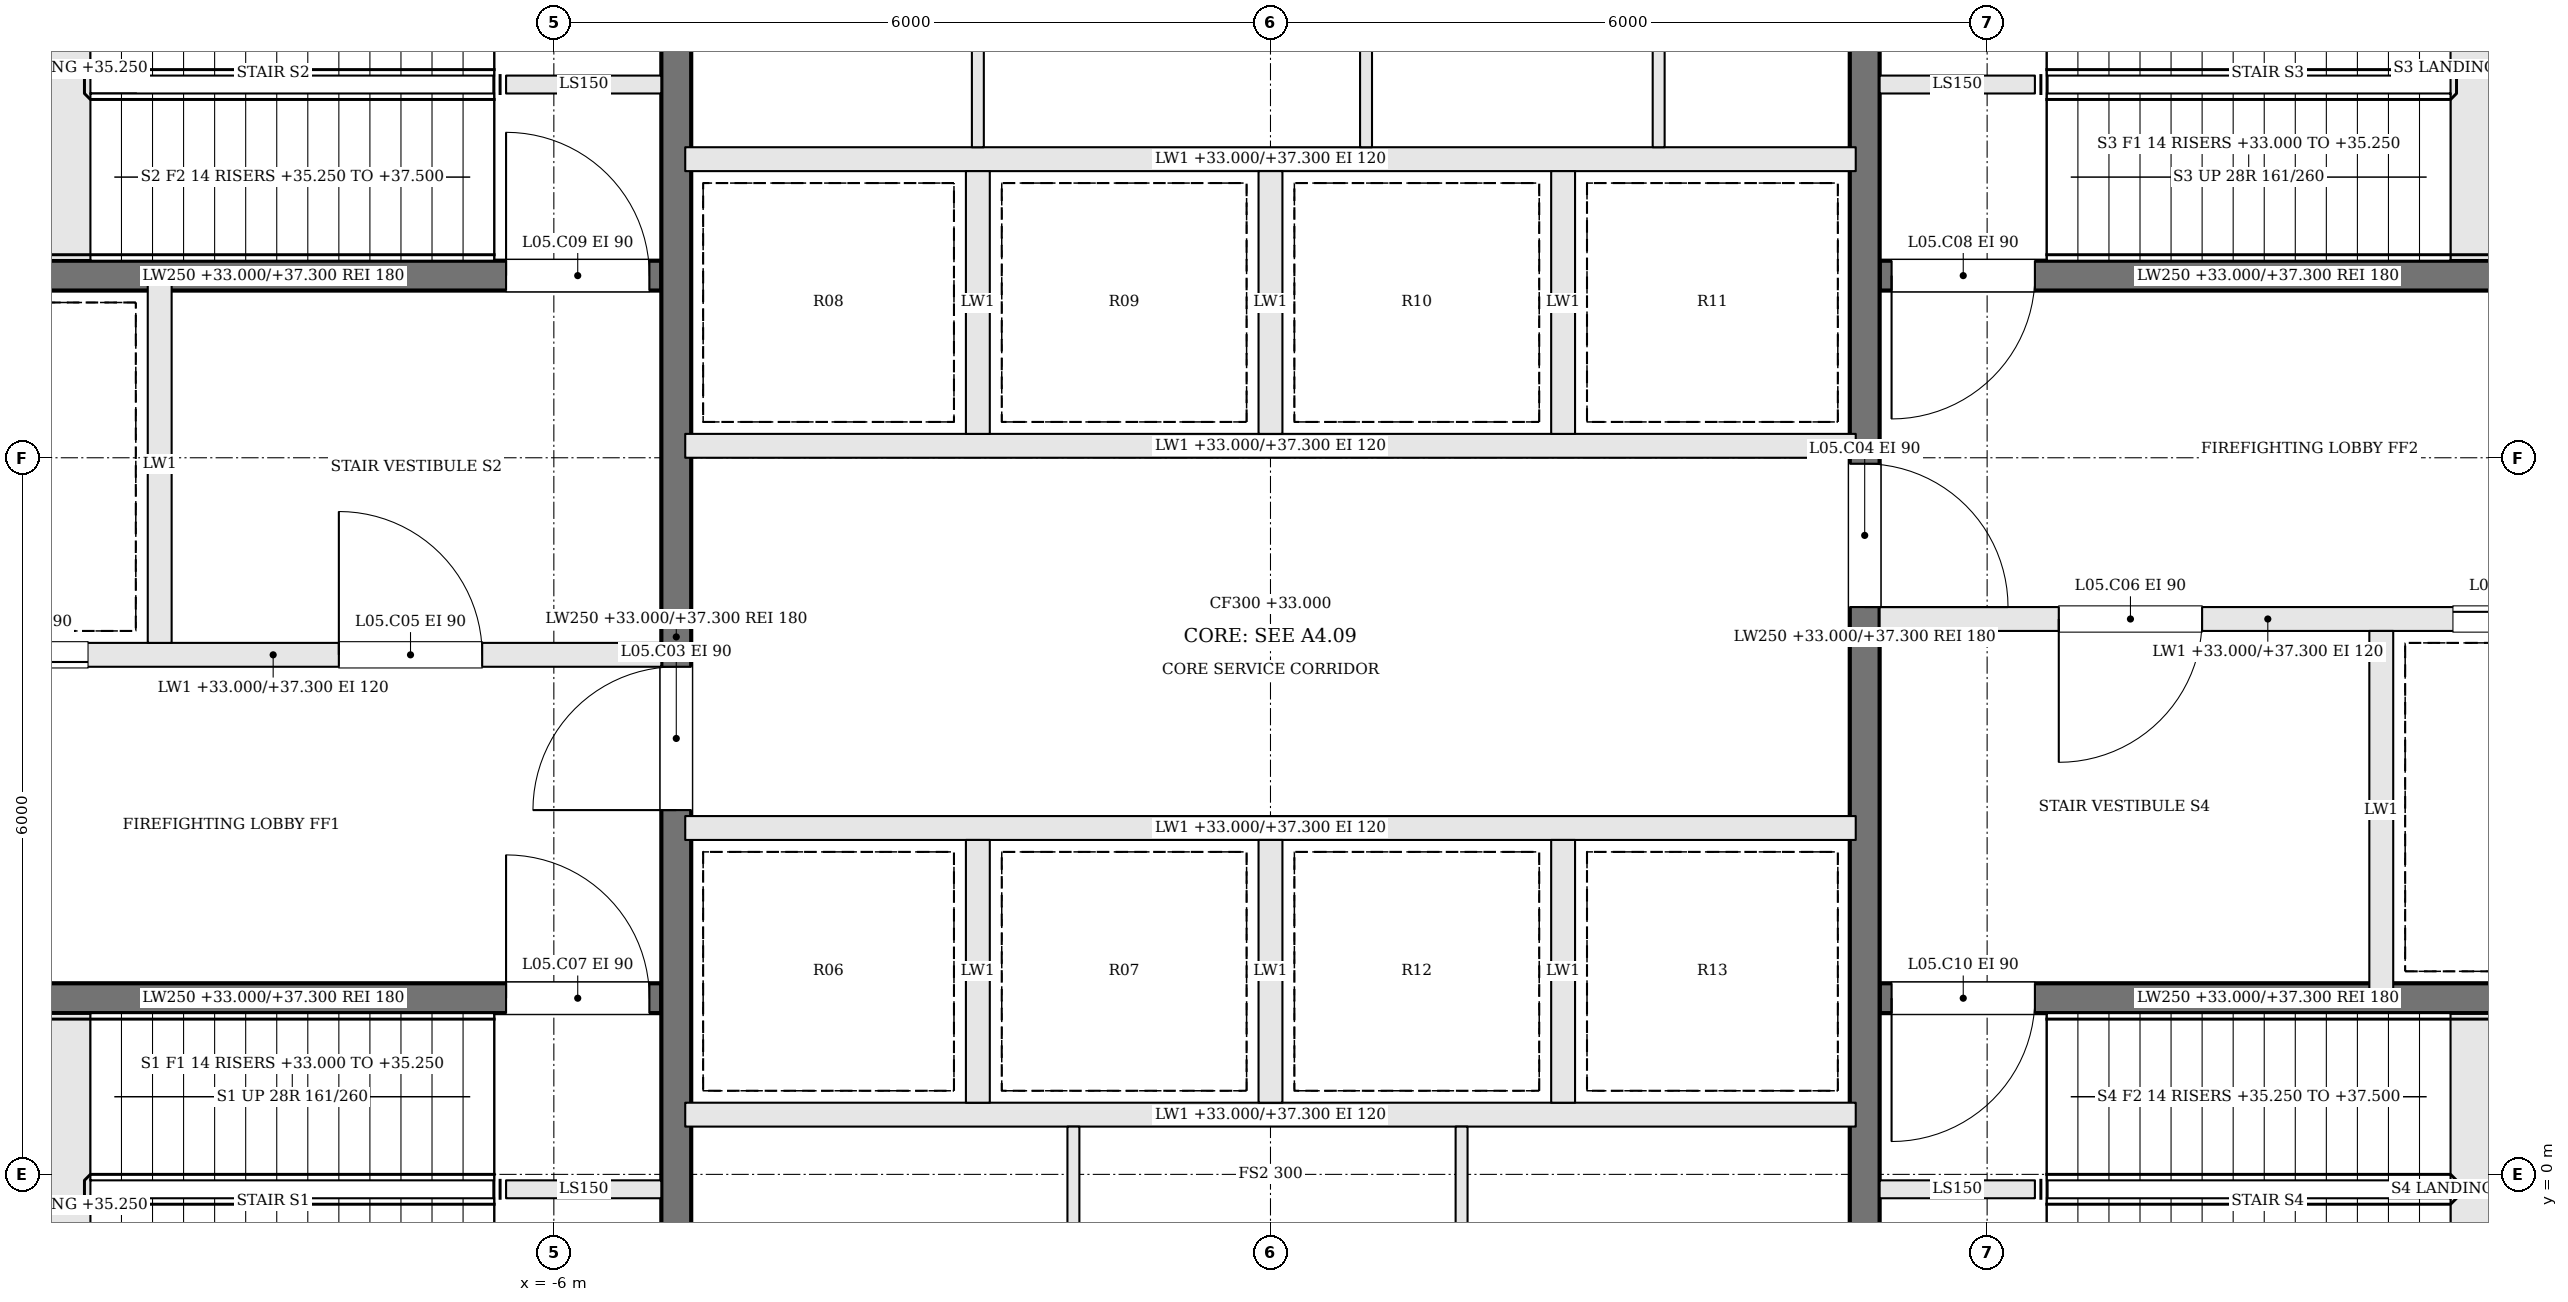
"""IFC4 building model, lengths in metres.
Left out: names, types, materials, properties, quantities, classifications, styles, units other than length and angle.
Written with IfcOpenShell. Run it as: python <this file> out.ifc"""

import sys

from ifc_helpers import new_model, si_unit, direction, frame, frame_2d, origin, place, context, subcontext, project, spatial, rectangle, extrude, element, fill, save


model = new_model("IFC4")
c1 = context("Model", 3, precision=1e-05, world=origin(), true_north=direction((0.0, 1.0)))
c2 = subcontext(c1, "Body", "Model", "MODEL_VIEW")
j1 = project(units=[si_unit("LENGTHUNIT", "METRE"), si_unit("PLANEANGLEUNIT", "RADIAN")], contexts=[c1])
p1 = place(None, origin())
s1 = spatial("IfcSite", under=j1, at=p1, CompositionType="ELEMENT")
p2 = place(p1, origin())
s2 = spatial("IfcBuilding", under=s1, at=p2, CompositionType="ELEMENT")
p3 = place(p2, frame((0.0, 0.0, 33.0)))
s3 = spatial("IfcBuildingStorey", under=s2, at=p3, CompositionType="ELEMENT", Elevation=33.0)
for number, where, z_axis, x_axis in (
    (1, (-6.4, -0.125, 0.0), (0.0, 0.0, 1.0), (1.0, 0.0, 0.0)),
    (2, (6.4, 9.125, 0.0), (0.0, 0.0, 1.0), (-1.0, 0.0, 0.0)),
    (3, (-6.4, 9.125, 0.0), (0.0, 0.0, 1.0), (1.0, 0.0, 0.0)),
    (4, (6.4, -0.125, 0.0), (0.0, 0.0, 1.0), (-1.0, 0.0, 0.0)),
):
    element("IfcWall", number, at=place(p3, frame(where, z_axis=z_axis, x_axis=x_axis)), inside=s3, PredefinedType="SOLIDWALL", context=c2, shape_type="SweptSolid", body=[
        extrude(rectangle(XDim=1.3, YDim=0.15, at=frame_2d((0.65, 0.0))), origin(), (0.0, 0.0, 1.0), 4.3),
    ])
p4 = place(p3, frame((-11.6, 1.475, 0.0), z_axis=(0.0, 0.0, 1.0), x_axis=(1.0, 0.0, 0.0)))
e5 = element("IfcWall", 5, at=p4, inside=s3, PredefinedType="SOLIDWALL", context=c2, shape_type="SweptSolid", body=[
    extrude(rectangle(XDim=6.5, YDim=0.25, at=frame_2d((3.25, 0.0))), origin(), (0.0, 0.0, 1.0), 4.3),
])
p5 = place(p4, frame((5.2, 0.0, 0.0)))
e6 = element("IfcOpeningElement", 6, at=p5, cuts=e5, PredefinedType="OPENING", context=c2, shape_type="SweptSolid", body=[
    extrude(rectangle(XDim=1.2, YDim=2.1, at=frame_2d((0.6, 1.05))), frame((0.0, 0.135, 0.0), z_axis=(0.0, -1.0, 0.0), x_axis=(1.0, 0.0, 0.0)), (0.0, 0.0, 1.0), 0.27),
])
p6 = place(p3, frame((11.6, 7.525, 0.0), z_axis=(0.0, 0.0, 1.0), x_axis=(-1.0, 0.0, 0.0)))
e7 = element("IfcWall", 7, at=p6, inside=s3, PredefinedType="SOLIDWALL", context=c2, shape_type="SweptSolid", body=[
    extrude(rectangle(XDim=6.5, YDim=0.25, at=frame_2d((3.25, 0.0))), origin(), (0.0, 0.0, 1.0), 4.3),
])
p7 = place(p6, frame((5.2, 0.0, 0.0)))
e8 = element("IfcOpeningElement", 8, at=p7, cuts=e7, PredefinedType="OPENING", context=c2, shape_type="SweptSolid", body=[
    extrude(rectangle(XDim=1.2, YDim=2.1, at=frame_2d((0.6, 1.05))), frame((0.0, 0.135, 0.0), z_axis=(0.0, -1.0, 0.0), x_axis=(1.0, 0.0, 0.0)), (0.0, 0.0, 1.0), 0.27),
])
p8 = place(p3, frame((-11.6, 4.35, 0.0), z_axis=(0.0, 0.0, 1.0), x_axis=(1.0, 0.0, 0.0)))
e9 = element("IfcWall", 9, at=p8, inside=s3, PredefinedType="SOLIDWALL", context=c2, shape_type="SweptSolid", body=[
    extrude(rectangle(XDim=6.5, YDim=0.2, at=frame_2d((3.25, 0.0))), origin(), (0.0, 0.0, 1.0), 4.3),
])
p9 = place(p8, frame((3.8, 0.0, 0.0)))
e10 = element("IfcOpeningElement", 10, at=p9, cuts=e9, PredefinedType="OPENING", context=c2, shape_type="SweptSolid", body=[
    extrude(rectangle(XDim=1.2, YDim=2.1, at=frame_2d((0.6, 1.05))), frame((0.0, 0.11, 0.0), z_axis=(0.0, -1.0, 0.0), x_axis=(1.0, 0.0, 0.0)), (0.0, 0.0, 1.0), 0.22),
])
p10 = place(p8, frame((0.5, 0.0, 0.0)))
e11 = element("IfcOpeningElement", 11, at=p10, cuts=e9, PredefinedType="OPENING", context=c2, shape_type="SweptSolid", body=[
    extrude(rectangle(XDim=1.2, YDim=2.1, at=frame_2d((0.6, 1.05))), frame((0.0, 0.11, 0.0), z_axis=(0.0, -1.0, 0.0), x_axis=(1.0, 0.0, 0.0)), (0.0, 0.0, 1.0), 0.22),
])
p11 = place(p3, frame((11.6, 4.65, 0.0), z_axis=(0.0, 0.0, 1.0), x_axis=(-1.0, 0.0, 0.0)))
e12 = element("IfcWall", 12, at=p11, inside=s3, PredefinedType="SOLIDWALL", context=c2, shape_type="SweptSolid", body=[
    extrude(rectangle(XDim=6.5, YDim=0.2, at=frame_2d((3.25, 0.0))), origin(), (0.0, 0.0, 1.0), 4.3),
])
p12 = place(p11, frame((3.8, 0.0, 0.0)))
e13 = element("IfcOpeningElement", 13, at=p12, cuts=e12, PredefinedType="OPENING", context=c2, shape_type="SweptSolid", body=[
    extrude(rectangle(XDim=1.2, YDim=2.1, at=frame_2d((0.6, 1.05))), frame((0.0, 0.11, 0.0), z_axis=(0.0, -1.0, 0.0), x_axis=(1.0, 0.0, 0.0)), (0.0, 0.0, 1.0), 0.22),
])
p13 = place(p11, frame((0.5, 0.0, 0.0)))
e14 = element("IfcOpeningElement", 14, at=p13, cuts=e12, PredefinedType="OPENING", context=c2, shape_type="SweptSolid", body=[
    extrude(rectangle(XDim=1.2, YDim=2.1, at=frame_2d((0.6, 1.05))), frame((0.0, 0.11, 0.0), z_axis=(0.0, -1.0, 0.0), x_axis=(1.0, 0.0, 0.0)), (0.0, 0.0, 1.0), 0.22),
])
p14 = place(p3, frame((-11.6, 7.525, 0.0), z_axis=(0.0, 0.0, 1.0), x_axis=(1.0, 0.0, 0.0)))
e15 = element("IfcWall", 15, at=p14, inside=s3, PredefinedType="SOLIDWALL", context=c2, shape_type="SweptSolid", body=[
    extrude(rectangle(XDim=6.5, YDim=0.25, at=frame_2d((3.25, 0.0))), origin(), (0.0, 0.0, 1.0), 4.3),
])
p15 = place(p14, frame((5.2, 0.0, 0.0)))
e16 = element("IfcOpeningElement", 16, at=p15, cuts=e15, PredefinedType="OPENING", context=c2, shape_type="SweptSolid", body=[
    extrude(rectangle(XDim=1.2, YDim=2.1, at=frame_2d((0.6, 1.05))), frame((0.0, 0.135, 0.0), z_axis=(0.0, -1.0, 0.0), x_axis=(1.0, 0.0, 0.0)), (0.0, 0.0, 1.0), 0.27),
])
p16 = place(p3, frame((11.6, 1.475, 0.0), z_axis=(0.0, 0.0, 1.0), x_axis=(-1.0, 0.0, 0.0)))
e17 = element("IfcWall", 17, at=p16, inside=s3, PredefinedType="SOLIDWALL", context=c2, shape_type="SweptSolid", body=[
    extrude(rectangle(XDim=6.5, YDim=0.25, at=frame_2d((3.25, 0.0))), origin(), (0.0, 0.0, 1.0), 4.3),
])
p17 = place(p16, frame((5.2, 0.0, 0.0)))
e18 = element("IfcOpeningElement", 18, at=p17, cuts=e17, PredefinedType="OPENING", context=c2, shape_type="SweptSolid", body=[
    extrude(rectangle(XDim=1.2, YDim=2.1, at=frame_2d((0.6, 1.05))), frame((0.0, 0.135, 0.0), z_axis=(0.0, -1.0, 0.0), x_axis=(1.0, 0.0, 0.0)), (0.0, 0.0, 1.0), 0.27),
])
for number, where, z_axis, x_axis in (
    (19, (-9.3, 4.45, 0.0), (0.0, 0.0, 1.0), (0.0, 1.0, 0.0)),
    (20, (9.3, 4.55, 0.0), (0.0, 0.0, 1.0), (0.0, -1.0, 0.0)),
):
    element("IfcWall", number, at=place(p3, frame(where, z_axis=z_axis, x_axis=x_axis)), inside=s3, PredefinedType="SOLIDWALL", context=c2, shape_type="SweptSolid", body=[
        extrude(rectangle(XDim=3.0, YDim=0.2, at=frame_2d((1.5, 0.0))), origin(), (0.0, 0.0, 1.0), 4.3),
    ])
p18 = place(p3, frame((-4.975, -1.6, 0.0), z_axis=(0.0, 0.0, 1.0), x_axis=(0.0, 1.0, 0.0)))
e21 = element("IfcWall", 21, at=p18, inside=s3, PredefinedType="SOLIDWALL", context=c2, shape_type="SweptSolid", body=[
    extrude(rectangle(XDim=12.2, YDim=0.25, at=frame_2d((6.1, 0.0))), origin(), (0.0, 0.0, 1.0), 4.3),
])
p19 = place(p18, frame((4.65, 0.0, 0.0)))
e22 = element("IfcOpeningElement", 22, at=p19, cuts=e21, PredefinedType="OPENING", context=c2, shape_type="SweptSolid", body=[
    extrude(rectangle(XDim=1.2, YDim=2.1, at=frame_2d((0.6, 1.05))), frame((0.0, 0.135, 0.0), z_axis=(0.0, -1.0, 0.0), x_axis=(1.0, 0.0, 0.0)), (0.0, 0.0, 1.0), 0.27),
])
p20 = place(p3, frame((4.975, 10.6, 0.0), z_axis=(0.0, 0.0, 1.0), x_axis=(0.0, -1.0, 0.0)))
e23 = element("IfcWall", 23, at=p20, inside=s3, PredefinedType="SOLIDWALL", context=c2, shape_type="SweptSolid", body=[
    extrude(rectangle(XDim=12.2, YDim=0.25, at=frame_2d((6.1, 0.0))), origin(), (0.0, 0.0, 1.0), 4.3),
])
p21 = place(p20, frame((4.65, 0.0, 0.0)))
e24 = element("IfcOpeningElement", 24, at=p21, cuts=e23, PredefinedType="OPENING", context=c2, shape_type="SweptSolid", body=[
    extrude(rectangle(XDim=1.2, YDim=2.1, at=frame_2d((0.6, 1.05))), frame((0.0, 0.135, 0.0), z_axis=(0.0, -1.0, 0.0), x_axis=(1.0, 0.0, 0.0)), (0.0, 0.0, 1.0), 0.27),
])
for number, where, z_axis, x_axis in (
    (25, (-4.9, 0.5, 0.0), (0.0, 0.0, 1.0), (1.0, 0.0, 0.0)),
    (26, (-4.9, 2.9, 0.0), (0.0, 0.0, 1.0), (1.0, 0.0, 0.0)),
    (27, (-4.9, 6.1, 0.0), (0.0, 0.0, 1.0), (1.0, 0.0, 0.0)),
    (28, (-4.9, 8.5, 0.0), (0.0, 0.0, 1.0), (1.0, 0.0, 0.0)),
):
    element("IfcWall", number, at=place(p3, frame(where, z_axis=z_axis, x_axis=x_axis)), inside=s3, PredefinedType="SOLIDWALL", context=c2, shape_type="SweptSolid", body=[
        extrude(rectangle(XDim=9.8, YDim=0.2, at=frame_2d((4.9, 0.0))), origin(), (0.0, 0.0, 1.0), 4.3),
    ])
for number, where, z_axis, x_axis in (
    (29, (-2.45, 0.6, 0.0), (0.0, 0.0, 1.0), (0.0, 1.0, 0.0)),
    (30, (0.0, 0.6, 0.0), (0.0, 0.0, 1.0), (0.0, 1.0, 0.0)),
    (31, (2.45, 0.6, 0.0), (0.0, 0.0, 1.0), (0.0, 1.0, 0.0)),
    (32, (-2.45, 6.2, 0.0), (0.0, 0.0, 1.0), (0.0, 1.0, 0.0)),
    (33, (0.0, 6.2, 0.0), (0.0, 0.0, 1.0), (0.0, 1.0, 0.0)),
    (34, (2.45, 6.2, 0.0), (0.0, 0.0, 1.0), (0.0, 1.0, 0.0)),
):
    element("IfcWall", number, at=place(p3, frame(where, z_axis=z_axis, x_axis=x_axis)), inside=s3, PredefinedType="SOLIDWALL", context=c2, shape_type="SweptSolid", body=[
        extrude(rectangle(XDim=2.2, YDim=0.2, at=frame_2d((1.1, 0.0))), origin(), (0.0, 0.0, 1.0), 4.3),
    ])
for number, where, z_axis, x_axis in (
    (35, (-1.65, -1.6, 0.0), (0.0, 0.0, 1.0), (0.0, 1.0, 0.0)),
    (36, (1.6, -1.6, 0.0), (0.0, 0.0, 1.0), (0.0, 1.0, 0.0)),
    (37, (-2.45, 8.6, 0.0), (0.0, 0.0, 1.0), (0.0, 1.0, 0.0)),
    (38, (0.8, 8.6, 0.0), (0.0, 0.0, 1.0), (0.0, 1.0, 0.0)),
    (39, (3.25, 8.6, 0.0), (0.0, 0.0, 1.0), (0.0, 1.0, 0.0)),
):
    element("IfcWall", number, at=place(p3, frame(where, z_axis=z_axis, x_axis=x_axis)), inside=s3, PredefinedType="PARTITIONING", context=c2, shape_type="SweptSolid", body=[
        extrude(rectangle(XDim=2.0, YDim=0.1, at=frame_2d((1.0, 0.0))), origin(), (0.0, 0.0, 1.0), 4.3),
    ])
p22 = place(p19, origin())
e40 = element("IfcDoor", 40, at=p22, inside=s3, OperationType="SINGLE_SWING_LEFT", PredefinedType="DOOR", context=c2, shape_type="SweptSolid", body=[
    extrude(rectangle(XDim=1.2, YDim=2.1, at=frame_2d((0.6, 1.05))), frame((0.0, 0.025, 0.0), z_axis=(0.0, -1.0, 0.0), x_axis=(1.0, 0.0, 0.0)), (0.0, 0.0, 1.0), 0.05),
])
fill(e22, e40)
p23 = place(p21, origin())
e41 = element("IfcDoor", 41, at=p23, inside=s3, OperationType="SINGLE_SWING_RIGHT", PredefinedType="DOOR", context=c2, shape_type="SweptSolid", body=[
    extrude(rectangle(XDim=1.2, YDim=2.1, at=frame_2d((0.6, 1.05))), frame((0.0, 0.025, 0.0), z_axis=(0.0, -1.0, 0.0), x_axis=(1.0, 0.0, 0.0)), (0.0, 0.0, 1.0), 0.05),
])
fill(e24, e41)
p24 = place(p9, origin())
e42 = element("IfcDoor", 42, at=p24, inside=s3, OperationType="SINGLE_SWING_LEFT", PredefinedType="DOOR", context=c2, shape_type="SweptSolid", body=[
    extrude(rectangle(XDim=1.2, YDim=2.1, at=frame_2d((0.6, 1.05))), frame((0.0, 0.025, 0.0), z_axis=(0.0, -1.0, 0.0), x_axis=(1.0, 0.0, 0.0)), (0.0, 0.0, 1.0), 0.05),
])
fill(e10, e42)
p25 = place(p12, origin())
e43 = element("IfcDoor", 43, at=p25, inside=s3, OperationType="SINGLE_SWING_RIGHT", PredefinedType="DOOR", context=c2, shape_type="SweptSolid", body=[
    extrude(rectangle(XDim=1.2, YDim=2.1, at=frame_2d((0.6, 1.05))), frame((0.0, 0.025, 0.0), z_axis=(0.0, -1.0, 0.0), x_axis=(1.0, 0.0, 0.0)), (0.0, 0.0, 1.0), 0.05),
])
fill(e13, e43)
p26 = place(p5, origin())
e44 = element("IfcDoor", 44, at=p26, inside=s3, OperationType="SINGLE_SWING_LEFT", PredefinedType="DOOR", context=c2, shape_type="SweptSolid", body=[
    extrude(rectangle(XDim=1.2, YDim=2.1, at=frame_2d((0.6, 1.05))), frame((0.0, 0.025, 0.0), z_axis=(0.0, -1.0, 0.0), x_axis=(1.0, 0.0, 0.0)), (0.0, 0.0, 1.0), 0.05),
])
fill(e6, e44)
p27 = place(p7, origin())
e45 = element("IfcDoor", 45, at=p27, inside=s3, OperationType="SINGLE_SWING_RIGHT", PredefinedType="DOOR", context=c2, shape_type="SweptSolid", body=[
    extrude(rectangle(XDim=1.2, YDim=2.1, at=frame_2d((0.6, 1.05))), frame((0.0, 0.025, 0.0), z_axis=(0.0, -1.0, 0.0), x_axis=(1.0, 0.0, 0.0)), (0.0, 0.0, 1.0), 0.05),
])
fill(e8, e45)
p28 = place(p15, origin())
e46 = element("IfcDoor", 46, at=p28, inside=s3, OperationType="SINGLE_SWING_LEFT", PredefinedType="DOOR", context=c2, shape_type="SweptSolid", body=[
    extrude(rectangle(XDim=1.2, YDim=2.1, at=frame_2d((0.6, 1.05))), frame((0.0, 0.025, 0.0), z_axis=(0.0, -1.0, 0.0), x_axis=(1.0, 0.0, 0.0)), (0.0, 0.0, 1.0), 0.05),
])
fill(e16, e46)
p29 = place(p17, origin())
e47 = element("IfcDoor", 47, at=p29, inside=s3, OperationType="SINGLE_SWING_RIGHT", PredefinedType="DOOR", context=c2, shape_type="SweptSolid", body=[
    extrude(rectangle(XDim=1.2, YDim=2.1, at=frame_2d((0.6, 1.05))), frame((0.0, 0.025, 0.0), z_axis=(0.0, -1.0, 0.0), x_axis=(1.0, 0.0, 0.0)), (0.0, 0.0, 1.0), 0.05),
])
fill(e18, e47)
p30 = place(p10, origin())
e48 = element("IfcDoor", 48, at=p30, inside=s3, OperationType="SLIDING_TO_RIGHT", PredefinedType="DOOR", context=c2, shape_type="SweptSolid", body=[
    extrude(rectangle(XDim=1.2, YDim=2.1, at=frame_2d((0.6, 1.05))), frame((0.0, 0.025, 0.0), z_axis=(0.0, -1.0, 0.0), x_axis=(1.0, 0.0, 0.0)), (0.0, 0.0, 1.0), 0.05),
])
fill(e11, e48)
p31 = place(p13, origin())
e49 = element("IfcDoor", 49, at=p31, inside=s3, OperationType="SLIDING_TO_RIGHT", PredefinedType="DOOR", context=c2, shape_type="SweptSolid", body=[
    extrude(rectangle(XDim=1.2, YDim=2.1, at=frame_2d((0.6, 1.05))), frame((0.0, 0.025, 0.0), z_axis=(0.0, -1.0, 0.0), x_axis=(1.0, 0.0, 0.0)), (0.0, 0.0, 1.0), 0.05),
])
fill(e14, e49)
save(model, sys.argv[1])
